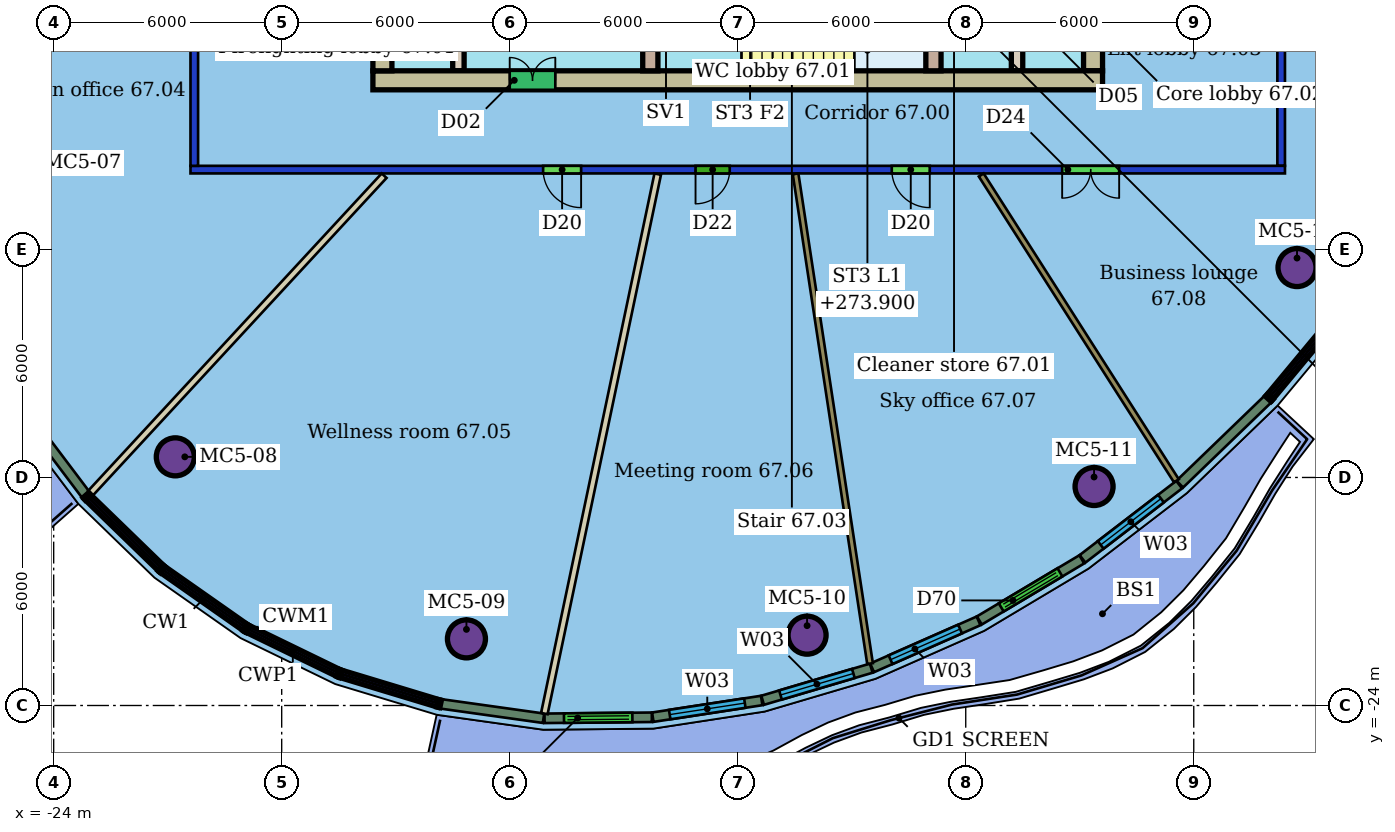
"""IFC4 building model, lengths in metres.
Left out: names, types, materials, properties, quantities, classifications, styles, units other than length and angle.
Written with IfcOpenShell. Run it as: python <this file> out.ifc"""

import sys

from ifc_helpers import new_model, si_unit, direction, frame, frame_2d, origin, origin_2d, place, context, subcontext, project, spatial, rectangle, hollow_circle, extrude, element, fill, save


model = new_model("IFC4")
c1 = context("Model", 3, precision=1e-05, world=origin(), true_north=direction((0.0, 1.0)))
c2 = subcontext(c1, "Body", "Model", "MODEL_VIEW")
j1 = project(units=[si_unit("LENGTHUNIT", "METRE"), si_unit("PLANEANGLEUNIT", "RADIAN")], contexts=[c1])
p1 = place(None, origin())
s1 = spatial("IfcSite", under=j1, at=p1, CompositionType="ELEMENT")
p2 = place(p1, origin())
s2 = spatial("IfcBuilding", under=s1, at=p2, CompositionType="ELEMENT")
p3 = place(p2, frame((0.0, 0.0, 272.1)))
s3 = spatial("IfcBuildingStorey", under=s2, at=p3, CompositionType="ELEMENT", Elevation=272.1)
for number, where, z_axis, x_axis in (
    (1, (-20.8, -17.457, 0.0), (0.0, 0.0, 1.0), (1.0, 0.0, 0.0)),
    (2, (-13.138, -22.247, 0.0), (0.0, 0.0, 1.0), (1.0, 0.0, 0.0)),
    (3, (-4.175, -22.149, 0.0), (0.0, 0.0, 1.0), (1.0, 0.0, 0.0)),
    (4, (3.377, -18.238, 0.0), (0.0, 0.0, 1.0), (1.0, 0.0, 0.0)),
    (5, (8.718, -12.477, 0.0), (0.0, 0.0, 1.0), (1.0, 0.0, 0.0)),
):
    element("IfcColumn", number, at=place(p3, frame(where, z_axis=z_axis, x_axis=x_axis)), inside=s3, PredefinedType="COLUMN", context=c2, shape_type="SweptSolid", body=[
        extrude(hollow_circle(Radius=0.5, WallThickness=0.04, at=origin_2d()), origin(), (0.0, 0.0, 1.0), 3.45),
    ])
p4 = place(p3, frame((8.4, -9.9, 0.0), z_axis=(0.0, 0.0, 1.0), x_axis=(-1.0, 0.0, 0.0)))
e6 = element("IfcWall", 6, at=p4, inside=s3, PredefinedType="PARTITIONING", context=c2, shape_type="SweptSolid", body=[
    extrude(rectangle(XDim=28.8, YDim=0.2, at=frame_2d((14.4, 0.0))), origin(), (0.0, 0.0, 1.0), 3.1),
])
p5 = place(p4, frame((18.521, 0.0, 0.0)))
e7 = element("IfcOpeningElement", 7, at=p5, cuts=e6, PredefinedType="OPENING", context=c2, shape_type="SweptSolid", body=[
    extrude(rectangle(XDim=1.0, YDim=2.1, at=frame_2d((0.5, 1.05))), frame((0.0, 0.11, 0.0), z_axis=(0.0, -1.0, 0.0), x_axis=(1.0, 0.0, 0.0)), (0.0, 0.0, 1.0), 0.22),
])
p6 = place(p4, frame((14.61, 0.0, 0.0)))
e8 = element("IfcOpeningElement", 8, at=p6, cuts=e6, PredefinedType="OPENING", context=c2, shape_type="SweptSolid", body=[
    extrude(rectangle(XDim=0.9, YDim=2.1, at=frame_2d((0.45, 1.05))), frame((0.0, 0.11, 0.0), z_axis=(0.0, -1.0, 0.0), x_axis=(1.0, 0.0, 0.0)), (0.0, 0.0, 1.0), 0.22),
])
p7 = place(p4, frame((9.347, 0.0, 0.0)))
e9 = element("IfcOpeningElement", 9, at=p7, cuts=e6, PredefinedType="OPENING", context=c2, shape_type="SweptSolid", body=[
    extrude(rectangle(XDim=1.0, YDim=2.1, at=frame_2d((0.5, 1.05))), frame((0.0, 0.11, 0.0), z_axis=(0.0, -1.0, 0.0), x_axis=(1.0, 0.0, 0.0)), (0.0, 0.0, 1.0), 0.22),
])
p8 = place(p4, frame((4.363, 0.0, 0.0)))
e10 = element("IfcOpeningElement", 10, at=p8, cuts=e6, PredefinedType="OPENING", context=c2, shape_type="SweptSolid", body=[
    extrude(rectangle(XDim=1.5, YDim=2.1, at=frame_2d((0.75, 1.05))), frame((0.0, 0.11, 0.0), z_axis=(0.0, -1.0, 0.0), x_axis=(1.0, 0.0, 0.0)), (0.0, 0.0, 1.0), 0.22),
])
p9 = place(p3, frame((-20.3, -9.8, 0.0), z_axis=(0.0, 0.0, 1.0), x_axis=(0.0, 1.0, 0.0)))
e11 = element("IfcWall", 11, at=p9, inside=s3, PredefinedType="PARTITIONING", context=c2, shape_type="SweptSolid", body=[
    extrude(rectangle(XDim=19.6, YDim=0.2, at=frame_2d((9.8, 0.0))), origin(), (0.0, 0.0, 1.0), 3.1),
])
p10 = place(p9, frame((13.142, 0.0, 0.0)))
e12 = element("IfcOpeningElement", 12, at=p10, cuts=e11, PredefinedType="OPENING", context=c2, shape_type="SweptSolid", body=[
    extrude(rectangle(XDim=1.5, YDim=2.4, at=frame_2d((0.75, 1.2))), frame((0.0, 0.11, 0.0), z_axis=(0.0, -1.0, 0.0), x_axis=(1.0, 0.0, 0.0)), (0.0, 0.0, 1.0), 0.22),
])
p11 = place(p9, frame((5.982, 0.0, 0.0)))
e13 = element("IfcOpeningElement", 13, at=p11, cuts=e11, PredefinedType="OPENING", context=c2, shape_type="SweptSolid", body=[
    extrude(rectangle(XDim=1.8, YDim=2.1, at=frame_2d((0.9, 1.05))), frame((0.0, 0.11, 0.0), z_axis=(0.0, -1.0, 0.0), x_axis=(1.0, 0.0, 0.0)), (0.0, 0.0, 1.0), 0.22),
])
p12 = place(p3, frame((8.3, 9.8, 0.0), z_axis=(0.0, 0.0, 1.0), x_axis=(0.0, -1.0, 0.0)))
e14 = element("IfcWall", 14, at=p12, inside=s3, PredefinedType="PARTITIONING", context=c2, shape_type="SweptSolid", body=[
    extrude(rectangle(XDim=19.6, YDim=0.2, at=frame_2d((9.8, 0.0))), origin(), (0.0, 0.0, 1.0), 3.1),
])
p13 = place(p12, frame((7.396, 0.0, 0.0)))
e15 = element("IfcOpeningElement", 15, at=p13, cuts=e14, PredefinedType="OPENING", context=c2, shape_type="SweptSolid", body=[
    extrude(rectangle(XDim=1.8, YDim=2.4, at=frame_2d((0.9, 1.2))), frame((0.0, 0.11, 0.0), z_axis=(0.0, -1.0, 0.0), x_axis=(1.0, 0.0, 0.0)), (0.0, 0.0, 1.0), 0.22),
])
p14 = place(p12, frame((2.153, 0.0, 0.0)))
e16 = element("IfcOpeningElement", 16, at=p14, cuts=e14, PredefinedType="OPENING", context=c2, shape_type="SweptSolid", body=[
    extrude(rectangle(XDim=1.0, YDim=2.4, at=frame_2d((0.5, 1.2))), frame((0.0, 0.11, 0.0), z_axis=(0.0, -1.0, 0.0), x_axis=(1.0, 0.0, 0.0)), (0.0, 0.0, 1.0), 0.22),
])
p15 = place(p3, frame((-23.031, -18.413, 0.0), z_axis=(0.0, 0.0, 1.0), x_axis=(0.679011342159, 0.734127779899, 0.0)))
e17 = element("IfcWall", 17, at=p15, inside=s3, PredefinedType="PARTITIONING", context=c2, shape_type="SweptSolid", body=[
    extrude(rectangle(XDim=11.379, YDim=0.175, at=frame_2d((5.69, 0.0))), origin(), (0.0, 0.0, 1.0), 3.45),
])
p16 = place(p3, frame((-11.089, -24.213, 0.0), z_axis=(0.0, 0.0, 1.0), x_axis=(0.205700846856, 0.978614919978, 0.0)))
e18 = element("IfcWall", 18, at=p16, inside=s3, PredefinedType="PARTITIONING", context=c2, shape_type="SweptSolid", body=[
    extrude(rectangle(XDim=14.505, YDim=0.175, at=frame_2d((7.252, 0.0))), origin(), (0.0, 0.0, 1.0), 3.45),
])
p17 = place(p3, frame((-2.518, -22.898, 0.0), z_axis=(0.0, 0.0, 1.0), x_axis=(-0.150328576639, 0.988636090301, 0.0)))
e19 = element("IfcWall", 19, at=p17, inside=s3, PredefinedType="PARTITIONING", context=c2, shape_type="SweptSolid", body=[
    extrude(rectangle(XDim=13.035, YDim=0.15, at=frame_2d((6.517, 0.0))), origin(), (0.0, 0.0, 1.0), 3.45),
])
p18 = place(p3, frame((5.543, -18.088, 0.0), z_axis=(0.0, 0.0, 1.0), x_axis=(-0.537970500941, 0.842963664767, 0.0)))
e20 = element("IfcWall", 20, at=p18, inside=s3, PredefinedType="PARTITIONING", context=c2, shape_type="SweptSolid", body=[
    extrude(rectangle(XDim=9.547, YDim=0.15, at=frame_2d((4.773, 0.0))), origin(), (0.0, 0.0, 1.0), 3.45),
])
p19 = place(p3, frame((13.378, -7.552, 0.0), z_axis=(0.0, 0.0, 1.0), x_axis=(-0.931738210827, 0.363130701656, 0.0)))
e21 = element("IfcWall", 21, at=p19, inside=s3, PredefinedType="PARTITIONING", context=c2, shape_type="SweptSolid", body=[
    extrude(rectangle(XDim=5.284, YDim=0.3, at=frame_2d((2.642, 0.0))), origin(), (0.0, 0.0, 1.0), 3.45),
])
p20 = place(p3, frame((-24.796, -16.281, 0.0), z_axis=(0.0, 0.0, 1.0), x_axis=(0.602094992284, -0.798424461215, 0.0)))
e22 = element("IfcWall", 22, at=p20, inside=s3, PredefinedType="SOLIDWALL", context=c2, shape_type="SweptSolid", body=[
    extrude(rectangle(XDim=2.719, YDim=0.25, at=frame_2d((1.36, 0.0))), origin(), (0.0, 0.0, 1.0), 3.15),
])
p21 = place(p3, frame((-13.803, -23.958, 0.0), z_axis=(0.0, 0.0, 1.0), x_axis=(0.99032300217, -0.138781667998, 0.0)))
e23 = element("IfcWall", 23, at=p21, inside=s3, PredefinedType="SOLIDWALL", context=c2, shape_type="SweptSolid", body=[
    extrude(rectangle(XDim=2.72, YDim=0.25, at=frame_2d((1.36, 0.0))), origin(), (0.0, 0.0, 1.0), 3.15),
])
p22 = place(p3, frame((-11.084, -24.337, 0.0), z_axis=(0.0, 0.0, 1.0), x_axis=(0.999952276814, 0.009769549307, 0.0)))
e24 = element("IfcWall", 24, at=p22, inside=s3, PredefinedType="SOLIDWALL", context=c2, shape_type="SweptSolid", body=[
    extrude(rectangle(XDim=2.824, YDim=0.25, at=frame_2d((1.412, 0.0))), origin(), (0.0, 0.0, 1.0), 3.15),
])
p23 = place(p22, frame((0.512, 0.0, 0.0)))
e25 = element("IfcOpeningElement", 25, at=p23, cuts=e24, PredefinedType="OPENING", context=c2, shape_type="SweptSolid", body=[
    extrude(rectangle(XDim=1.8, YDim=2.4, at=frame_2d((0.9, 1.2))), frame((0.0, 0.135, 0.0), z_axis=(0.0, -1.0, 0.0), x_axis=(1.0, 0.0, 0.0)), (0.0, 0.0, 1.0), 0.27),
])
p24 = place(p3, frame((-8.234, -24.308, 0.0), z_axis=(0.0, 0.0, 1.0), x_axis=(0.988456248217, 0.151506585204, 0.0)))
e26 = element("IfcWall", 26, at=p24, inside=s3, PredefinedType="SOLIDWALL", context=c2, shape_type="SweptSolid", body=[
    extrude(rectangle(XDim=2.899, YDim=0.25, at=frame_2d((1.449, 0.0))), origin(), (0.0, 0.0, 1.0), 3.15),
])
p25 = place(p24, frame((0.449, 0.0, 0.9)))
e27 = element("IfcOpeningElement", 27, at=p25, cuts=e26, PredefinedType="OPENING", context=c2, shape_type="SweptSolid", body=[
    extrude(rectangle(XDim=2.0, YDim=2.1, at=frame_2d((1.0, 1.05))), frame((0.0, 0.135, 0.0), z_axis=(0.0, -1.0, 0.0), x_axis=(1.0, 0.0, 0.0)), (0.0, 0.0, 1.0), 0.27),
])
p26 = place(p3, frame((-5.345, -23.863, 0.0), z_axis=(0.0, 0.0, 1.0), x_axis=(0.958992915497, 0.283430040798, 0.0)))
e28 = element("IfcWall", 28, at=p26, inside=s3, PredefinedType="SOLIDWALL", context=c2, shape_type="SweptSolid", body=[
    extrude(rectangle(XDim=2.98, YDim=0.25, at=frame_2d((1.49, 0.0))), origin(), (0.0, 0.0, 1.0), 3.15),
])
p27 = place(p26, frame((0.49, 0.0, 0.9)))
e29 = element("IfcOpeningElement", 29, at=p27, cuts=e28, PredefinedType="OPENING", context=c2, shape_type="SweptSolid", body=[
    extrude(rectangle(XDim=2.0, YDim=2.1, at=frame_2d((1.0, 1.05))), frame((0.0, 0.135, 0.0), z_axis=(0.0, -1.0, 0.0), x_axis=(1.0, 0.0, 0.0)), (0.0, 0.0, 1.0), 0.27),
])
p28 = place(p3, frame((-2.464, -23.01, 0.0), z_axis=(0.0, 0.0, 1.0), x_axis=(0.914844180747, 0.403807039258, 0.0)))
e30 = element("IfcWall", 30, at=p28, inside=s3, PredefinedType="SOLIDWALL", context=c2, shape_type="SweptSolid", body=[
    extrude(rectangle(XDim=3.062, YDim=0.25, at=frame_2d((1.531, 0.0))), origin(), (0.0, 0.0, 1.0), 3.15),
])
p29 = place(p28, frame((0.531, 0.0, 0.9)))
e31 = element("IfcOpeningElement", 31, at=p29, cuts=e30, PredefinedType="OPENING", context=c2, shape_type="SweptSolid", body=[
    extrude(rectangle(XDim=2.0, YDim=2.1, at=frame_2d((1.0, 1.05))), frame((0.0, 0.135, 0.0), z_axis=(0.0, -1.0, 0.0), x_axis=(1.0, 0.0, 0.0)), (0.0, 0.0, 1.0), 0.27),
])
p30 = place(p3, frame((0.358, -21.763, 0.0), z_axis=(0.0, 0.0, 1.0), x_axis=(0.858787089802, 0.512332640371, 0.0)))
e32 = element("IfcWall", 32, at=p30, inside=s3, PredefinedType="SOLIDWALL", context=c2, shape_type="SweptSolid", body=[
    extrude(rectangle(XDim=3.139, YDim=0.25, at=frame_2d((1.57, 0.0))), origin(), (0.0, 0.0, 1.0), 3.15),
])
p31 = place(p30, frame((0.67, 0.0, 0.0)))
e33 = element("IfcOpeningElement", 33, at=p31, cuts=e32, PredefinedType="OPENING", context=c2, shape_type="SweptSolid", body=[
    extrude(rectangle(XDim=1.8, YDim=2.4, at=frame_2d((0.9, 1.2))), frame((0.0, 0.135, 0.0), z_axis=(0.0, -1.0, 0.0), x_axis=(1.0, 0.0, 0.0)), (0.0, 0.0, 1.0), 0.27),
])
p32 = place(p3, frame((3.073, -20.142, 0.0), z_axis=(0.0, 0.0, 1.0), x_axis=(0.793206691654, 0.608952497586, 0.0)))
e34 = element("IfcWall", 34, at=p32, inside=s3, PredefinedType="SOLIDWALL", context=c2, shape_type="SweptSolid", body=[
    extrude(rectangle(XDim=3.207, YDim=0.25, at=frame_2d((1.603, 0.0))), origin(), (0.0, 0.0, 1.0), 3.15),
])
p33 = place(p32, frame((0.603, 0.0, 0.9)))
e35 = element("IfcOpeningElement", 35, at=p33, cuts=e34, PredefinedType="OPENING", context=c2, shape_type="SweptSolid", body=[
    extrude(rectangle(XDim=2.0, YDim=2.1, at=frame_2d((1.0, 1.05))), frame((0.0, 0.135, 0.0), z_axis=(0.0, -1.0, 0.0), x_axis=(1.0, 0.0, 0.0)), (0.0, 0.0, 1.0), 0.27),
])
p34 = place(p3, frame((5.633, -18.175, 0.0), z_axis=(0.0, 0.0, 1.0), x_axis=(0.719595006307, 0.694393999757, 0.0)))
e36 = element("IfcWall", 36, at=p34, inside=s3, PredefinedType="SOLIDWALL", context=c2, shape_type="SweptSolid", body=[
    extrude(rectangle(XDim=3.216, YDim=0.25, at=frame_2d((1.608, 0.0))), origin(), (0.0, 0.0, 1.0), 3.15),
])
p35 = place(p3, frame((-15.6, -7.55, 0.0), z_axis=(0.0, 0.0, 1.0), x_axis=(1.0, 0.0, 0.0)))
e37 = element("IfcWall", 37, at=p35, inside=s3, PredefinedType="SHEAR", context=c2, shape_type="SweptSolid", body=[
    extrude(rectangle(XDim=19.2, YDim=0.5, at=frame_2d((9.6, 0.0))), origin(), (0.0, 0.0, 1.0), 3.3),
])
p36 = place(p35, frame((3.6, 0.0, 0.0)))
e38 = element("IfcOpeningElement", 38, at=p36, cuts=e37, PredefinedType="OPENING", context=c2, shape_type="SweptSolid", body=[
    extrude(rectangle(XDim=1.2, YDim=2.1, at=frame_2d((0.6, 1.05))), frame((0.0, 0.26, 0.0), z_axis=(0.0, -1.0, 0.0), x_axis=(1.0, 0.0, 0.0)), (0.0, 0.0, 1.0), 0.52),
])
p37 = place(p3, frame((-15.35, 7.3, 0.0), z_axis=(0.0, 0.0, 1.0), x_axis=(0.0, -1.0, 0.0)))
e39 = element("IfcWall", 39, at=p37, inside=s3, PredefinedType="SHEAR", context=c2, shape_type="SweptSolid", body=[
    extrude(rectangle(XDim=14.6, YDim=0.5, at=frame_2d((7.3, 0.0))), origin(), (0.0, 0.0, 1.0), 3.3),
])
p38 = place(p37, frame((10.6, 0.0, 0.0)))
e40 = element("IfcOpeningElement", 40, at=p38, cuts=e39, PredefinedType="OPENING", context=c2, shape_type="SweptSolid", body=[
    extrude(rectangle(XDim=1.2, YDim=2.1, at=frame_2d((0.6, 1.05))), frame((0.0, 0.26, 0.0), z_axis=(0.0, -1.0, 0.0), x_axis=(1.0, 0.0, 0.0)), (0.0, 0.0, 1.0), 0.52),
])
p39 = place(p37, frame((2.8, 0.0, 0.0)))
e41 = element("IfcOpeningElement", 41, at=p39, cuts=e39, PredefinedType="OPENING", context=c2, shape_type="SweptSolid", body=[
    extrude(rectangle(XDim=1.2, YDim=2.1, at=frame_2d((0.6, 1.05))), frame((0.0, 0.26, 0.0), z_axis=(0.0, -1.0, 0.0), x_axis=(1.0, 0.0, 0.0)), (0.0, 0.0, 1.0), 0.52),
])
p40 = place(p3, frame((3.35, -7.3, 0.0), z_axis=(0.0, 0.0, 1.0), x_axis=(0.0, 1.0, 0.0)))
e42 = element("IfcWall", 42, at=p40, inside=s3, PredefinedType="SHEAR", context=c2, shape_type="SweptSolid", body=[
    extrude(rectangle(XDim=14.6, YDim=0.5, at=frame_2d((7.3, 0.0))), origin(), (0.0, 0.0, 1.0), 3.3),
])
p41 = place(p40, frame((2.8, 0.0, 0.0)))
e43 = element("IfcOpeningElement", 43, at=p41, cuts=e42, PredefinedType="OPENING", context=c2, shape_type="SweptSolid", body=[
    extrude(rectangle(XDim=1.2, YDim=2.1, at=frame_2d((0.6, 1.05))), frame((0.0, 0.26, 0.0), z_axis=(0.0, -1.0, 0.0), x_axis=(1.0, 0.0, 0.0)), (0.0, 0.0, 1.0), 0.52),
])
p42 = place(p40, frame((10.6, 0.0, 0.0)))
e44 = element("IfcOpeningElement", 44, at=p42, cuts=e42, PredefinedType="OPENING", context=c2, shape_type="SweptSolid", body=[
    extrude(rectangle(XDim=1.2, YDim=2.1, at=frame_2d((0.6, 1.05))), frame((0.0, 0.26, 0.0), z_axis=(0.0, -1.0, 0.0), x_axis=(1.0, 0.0, 0.0)), (0.0, 0.0, 1.0), 0.52),
])
p43 = place(p3, frame((-13.35, 7.3, 0.0), z_axis=(0.0, 0.0, 1.0), x_axis=(0.0, -1.0, 0.0)))
e45 = element("IfcWall", 45, at=p43, inside=s3, PredefinedType="SHEAR", context=c2, shape_type="SweptSolid", body=[
    extrude(rectangle(XDim=14.6, YDim=0.3, at=frame_2d((7.3, 0.0))), origin(), (0.0, 0.0, 1.0), 3.3),
])
p44 = place(p43, frame((6.55, 0.0, 0.0)))
e46 = element("IfcOpeningElement", 46, at=p44, cuts=e45, PredefinedType="OPENING", context=c2, shape_type="SweptSolid", body=[
    extrude(rectangle(XDim=1.5, YDim=2.1, at=frame_2d((0.75, 1.05))), frame((0.0, 0.16, 0.0), z_axis=(0.0, -1.0, 0.0), x_axis=(1.0, 0.0, 0.0)), (0.0, 0.0, 1.0), 0.32),
])
p45 = place(p3, frame((1.35, -7.3, 0.0), z_axis=(0.0, 0.0, 1.0), x_axis=(0.0, 1.0, 0.0)))
e47 = element("IfcWall", 47, at=p45, inside=s3, PredefinedType="SHEAR", context=c2, shape_type="SweptSolid", body=[
    extrude(rectangle(XDim=14.6, YDim=0.3, at=frame_2d((7.3, 0.0))), origin(), (0.0, 0.0, 1.0), 3.3),
])
p46 = place(p45, frame((1.21, 0.0, 0.0)))
e48 = element("IfcOpeningElement", 48, at=p46, cuts=e47, PredefinedType="OPENING", context=c2, shape_type="SweptSolid", body=[
    extrude(rectangle(XDim=1.0, YDim=2.1, at=frame_2d((0.5, 1.05))), frame((0.0, 0.16, 0.0), z_axis=(0.0, -1.0, 0.0), x_axis=(1.0, 0.0, 0.0)), (0.0, 0.0, 1.0), 0.32),
])
p47 = place(p45, frame((6.55, 0.0, 0.0)))
e49 = element("IfcOpeningElement", 49, at=p47, cuts=e47, PredefinedType="OPENING", context=c2, shape_type="SweptSolid", body=[
    extrude(rectangle(XDim=1.5, YDim=2.1, at=frame_2d((0.75, 1.05))), frame((0.0, 0.16, 0.0), z_axis=(0.0, -1.0, 0.0), x_axis=(1.0, 0.0, 0.0)), (0.0, 0.0, 1.0), 0.32),
])
p48 = place(p3, frame((-8.3, -3.88, 0.0), z_axis=(0.0, 0.0, 1.0), x_axis=(0.0, -1.0, 0.0)))
e50 = element("IfcWall", 50, at=p48, inside=s3, PredefinedType="SHEAR", context=c2, shape_type="SweptSolid", body=[
    extrude(rectangle(XDim=3.42, YDim=0.4, at=frame_2d((1.71, 0.0))), origin(), (0.0, 0.0, 1.0), 3.3),
])
p49 = place(p48, frame((1.11, 0.0, 0.0)))
e51 = element("IfcOpeningElement", 51, at=p49, cuts=e50, PredefinedType="OPENING", context=c2, shape_type="SweptSolid", body=[
    extrude(rectangle(XDim=1.2, YDim=2.1, at=frame_2d((0.6, 1.05))), frame((0.0, 0.21, 0.0), z_axis=(0.0, -1.0, 0.0), x_axis=(1.0, 0.0, 0.0)), (0.0, 0.0, 1.0), 0.42),
])
p50 = place(p3, frame((-0.85, -3.88, 0.0), z_axis=(0.0, 0.0, 1.0), x_axis=(0.0, -1.0, 0.0)))
e52 = element("IfcWall", 52, at=p50, inside=s3, PredefinedType="SHEAR", context=c2, shape_type="SweptSolid", body=[
    extrude(rectangle(XDim=3.42, YDim=0.4, at=frame_2d((1.71, 0.0))), origin(), (0.0, 0.0, 1.0), 3.3),
])
p51 = place(p5, origin())
e53 = element("IfcDoor", 53, at=p51, inside=s3, OperationType="SINGLE_SWING_LEFT", PredefinedType="DOOR", context=c2, shape_type="SweptSolid", body=[
    extrude(rectangle(XDim=1.0, YDim=2.1, at=frame_2d((0.5, 1.05))), frame((0.0, 0.025, 0.0), z_axis=(0.0, -1.0, 0.0), x_axis=(1.0, 0.0, 0.0)), (0.0, 0.0, 1.0), 0.05),
])
fill(e7, e53)
p52 = place(p6, origin())
e54 = element("IfcDoor", 54, at=p52, inside=s3, OperationType="SINGLE_SWING_RIGHT", PredefinedType="DOOR", context=c2, shape_type="SweptSolid", body=[
    extrude(rectangle(XDim=0.9, YDim=2.1, at=frame_2d((0.45, 1.05))), frame((0.0, 0.025, 0.0), z_axis=(0.0, -1.0, 0.0), x_axis=(1.0, 0.0, 0.0)), (0.0, 0.0, 1.0), 0.05),
])
fill(e8, e54)
p53 = place(p7, origin())
e55 = element("IfcDoor", 55, at=p53, inside=s3, OperationType="SINGLE_SWING_LEFT", PredefinedType="DOOR", context=c2, shape_type="SweptSolid", body=[
    extrude(rectangle(XDim=1.0, YDim=2.1, at=frame_2d((0.5, 1.05))), frame((0.0, 0.025, 0.0), z_axis=(0.0, -1.0, 0.0), x_axis=(1.0, 0.0, 0.0)), (0.0, 0.0, 1.0), 0.05),
])
fill(e9, e55)
p54 = place(p8, origin())
e56 = element("IfcDoor", 56, at=p54, inside=s3, OperationType="DOUBLE_DOOR_SINGLE_SWING", PredefinedType="DOOR", context=c2, shape_type="SweptSolid", body=[
    extrude(rectangle(XDim=1.5, YDim=2.1, at=frame_2d((0.75, 1.05))), frame((0.0, 0.025, 0.0), z_axis=(0.0, -1.0, 0.0), x_axis=(1.0, 0.0, 0.0)), (0.0, 0.0, 1.0), 0.05),
])
fill(e10, e56)
p55 = place(p23, origin())
e57 = element("IfcDoor", 57, at=p55, inside=s3, OperationType="DOUBLE_DOOR_SLIDING", PredefinedType="DOOR", context=c2, shape_type="SweptSolid", body=[
    extrude(rectangle(XDim=1.8, YDim=2.4, at=frame_2d((0.9, 1.2))), frame((0.0, 0.025, 0.0), z_axis=(0.0, -1.0, 0.0), x_axis=(1.0, 0.0, 0.0)), (0.0, 0.0, 1.0), 0.05),
])
fill(e25, e57)
p56 = place(p25, origin())
e58 = element("IfcWindow", 58, at=p56, inside=s3, PartitioningType="SINGLE_PANEL", PredefinedType="WINDOW", context=c2, shape_type="SweptSolid", body=[
    extrude(rectangle(XDim=2.0, YDim=2.1, at=frame_2d((1.0, 1.05))), frame((0.0, 0.03, 0.0), z_axis=(0.0, -1.0, 0.0), x_axis=(1.0, 0.0, 0.0)), (0.0, 0.0, 1.0), 0.06),
])
fill(e27, e58)
p57 = place(p27, origin())
e59 = element("IfcWindow", 59, at=p57, inside=s3, PartitioningType="SINGLE_PANEL", PredefinedType="WINDOW", context=c2, shape_type="SweptSolid", body=[
    extrude(rectangle(XDim=2.0, YDim=2.1, at=frame_2d((1.0, 1.05))), frame((0.0, 0.03, 0.0), z_axis=(0.0, -1.0, 0.0), x_axis=(1.0, 0.0, 0.0)), (0.0, 0.0, 1.0), 0.06),
])
fill(e29, e59)
p58 = place(p29, origin())
e60 = element("IfcWindow", 60, at=p58, inside=s3, PartitioningType="SINGLE_PANEL", PredefinedType="WINDOW", context=c2, shape_type="SweptSolid", body=[
    extrude(rectangle(XDim=2.0, YDim=2.1, at=frame_2d((1.0, 1.05))), frame((0.0, 0.03, 0.0), z_axis=(0.0, -1.0, 0.0), x_axis=(1.0, 0.0, 0.0)), (0.0, 0.0, 1.0), 0.06),
])
fill(e31, e60)
p59 = place(p31, origin())
e61 = element("IfcDoor", 61, at=p59, inside=s3, OperationType="DOUBLE_DOOR_SLIDING", PredefinedType="DOOR", context=c2, shape_type="SweptSolid", body=[
    extrude(rectangle(XDim=1.8, YDim=2.4, at=frame_2d((0.9, 1.2))), frame((0.0, 0.025, 0.0), z_axis=(0.0, -1.0, 0.0), x_axis=(1.0, 0.0, 0.0)), (0.0, 0.0, 1.0), 0.05),
])
fill(e33, e61)
p60 = place(p33, origin())
e62 = element("IfcWindow", 62, at=p60, inside=s3, PartitioningType="SINGLE_PANEL", PredefinedType="WINDOW", context=c2, shape_type="SweptSolid", body=[
    extrude(rectangle(XDim=2.0, YDim=2.1, at=frame_2d((1.0, 1.05))), frame((0.0, 0.03, 0.0), z_axis=(0.0, -1.0, 0.0), x_axis=(1.0, 0.0, 0.0)), (0.0, 0.0, 1.0), 0.06),
])
fill(e35, e62)
p61 = place(p36, origin())
e63 = element("IfcDoor", 63, at=p61, inside=s3, OperationType="DOUBLE_DOOR_SINGLE_SWING", PredefinedType="NOTDEFINED", context=c2, shape_type="SweptSolid", body=[
    extrude(rectangle(XDim=1.2, YDim=2.1, at=frame_2d((0.6, 1.05))), frame((0.0, 0.025, 0.0), z_axis=(0.0, -1.0, 0.0), x_axis=(1.0, 0.0, 0.0)), (0.0, 0.0, 1.0), 0.05),
])
fill(e38, e63)
save(model, sys.argv[1])
